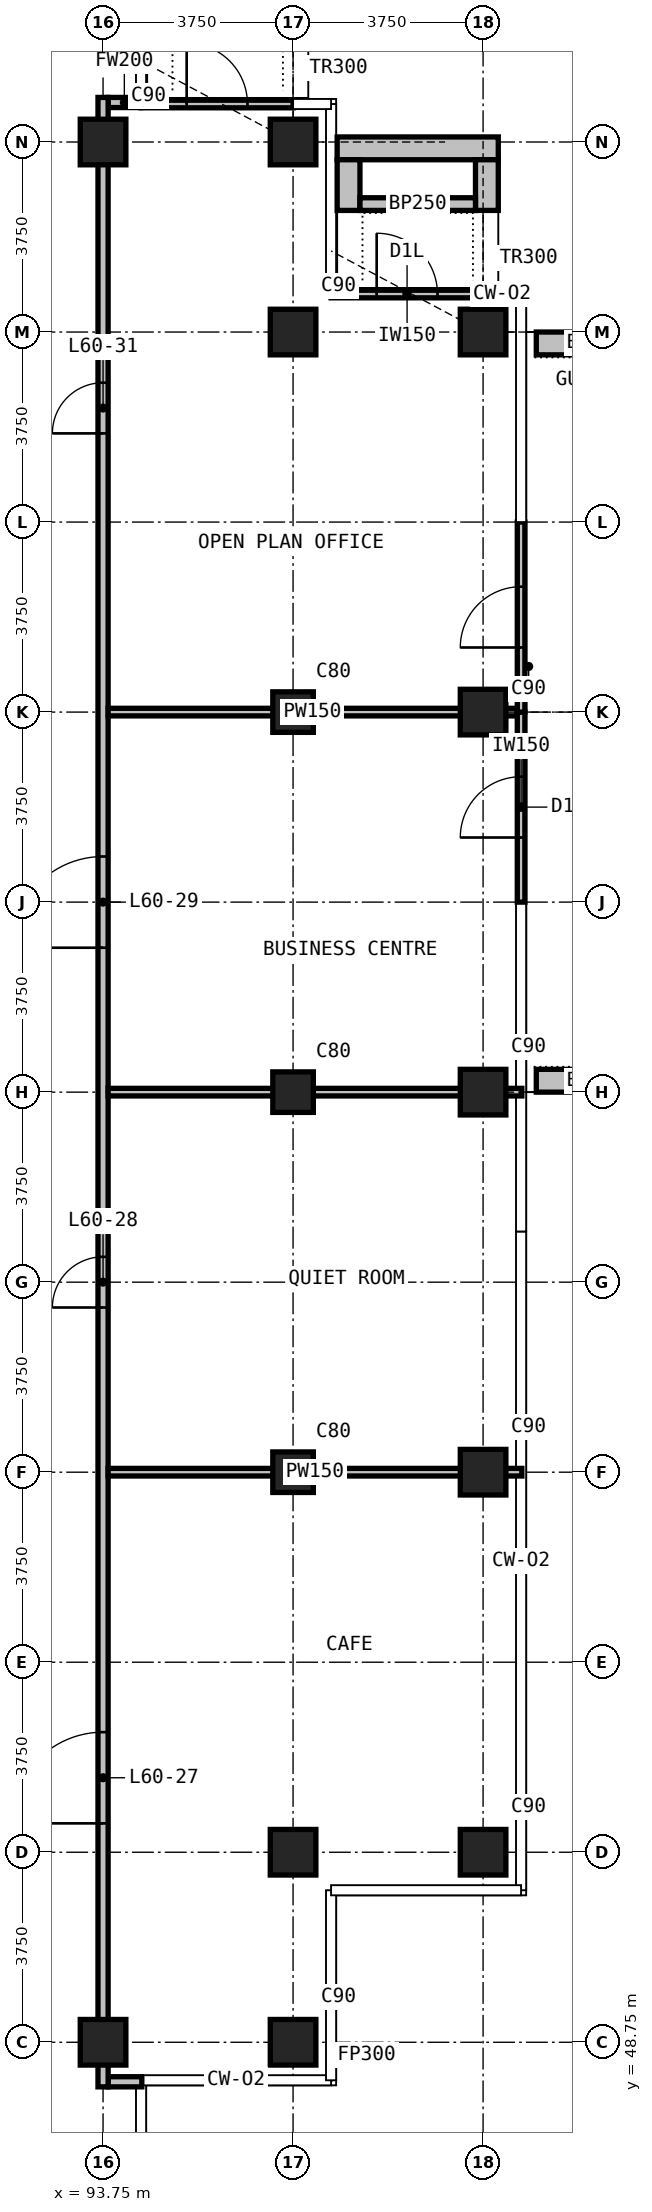
"""IFC4 building model, lengths in metres.
Left out: names, types, materials, properties, quantities, classifications, styles, units other than length and angle.
Written with IfcOpenShell. Run it as: python <this file> out.ifc"""

import sys

from ifc_helpers import new_model, si_unit, direction, frame, frame_2d, origin, origin_2d, place, context, subcontext, project, spatial, rectangle, extrude, element, fill, save


model = new_model("IFC4")
c1 = context("Model", 3, precision=1e-05, world=origin(), true_north=direction((0.0, 1.0)))
c2 = subcontext(c1, "Body", "Model", "MODEL_VIEW")
j1 = project(units=[si_unit("LENGTHUNIT", "METRE"), si_unit("PLANEANGLEUNIT", "RADIAN")], contexts=[c1])
p1 = place(None, origin())
s1 = spatial("IfcSite", under=j1, at=p1, CompositionType="ELEMENT")
p2 = place(p1, origin())
s2 = spatial("IfcBuilding", under=s1, at=p2, CompositionType="ELEMENT")
p3 = place(p2, frame((0.0, 0.0, 231.9)))
s3 = spatial("IfcBuildingStorey", under=s2, at=p3, CompositionType="ELEMENT", Elevation=231.9)
for number, where, z_axis, x_axis in (
    (1, (93.75, 48.75, 0.0), (0.0, 0.0, 1.0), (1.0, 0.0, 0.0)),
    (2, (93.75, 86.25, 0.0), (0.0, 0.0, 1.0), (1.0, 0.0, 0.0)),
    (3, (97.5, 48.75, 0.0), (0.0, 0.0, 1.0), (1.0, 0.0, 0.0)),
    (4, (97.5, 52.5, 0.0), (0.0, 0.0, 1.0), (1.0, 0.0, 0.0)),
):
    element("IfcColumn", number, at=place(p3, frame(where, z_axis=z_axis, x_axis=x_axis)), inside=s3, PredefinedType="COLUMN", context=c2, shape_type="SweptSolid", body=[
        extrude(rectangle(XDim=0.9, YDim=0.9, at=origin_2d()), origin(), (0.0, 0.0, 1.0), 3.6),
    ])
for number, where, z_axis, x_axis in (
    (5, (97.5, 60.0, 0.0), (0.0, 0.0, 1.0), (1.0, 0.0, 0.0)),
    (6, (97.5, 67.5, 0.0), (0.0, 0.0, 1.0), (1.0, 0.0, 0.0)),
    (7, (97.5, 75.0, 0.0), (0.0, 0.0, 1.0), (1.0, 0.0, 0.0)),
):
    element("IfcColumn", number, at=place(p3, frame(where, z_axis=z_axis, x_axis=x_axis)), inside=s3, PredefinedType="COLUMN", context=c2, shape_type="SweptSolid", body=[
        extrude(rectangle(XDim=0.8, YDim=0.8, at=origin_2d()), origin(), (0.0, 0.0, 1.0), 3.6),
    ])
for number, where, z_axis, x_axis in (
    (8, (97.5, 82.5, 0.0), (0.0, 0.0, 1.0), (1.0, 0.0, 0.0)),
    (9, (97.5, 86.25, 0.0), (0.0, 0.0, 1.0), (1.0, 0.0, 0.0)),
    (10, (101.25, 52.5, 0.0), (0.0, 0.0, 1.0), (1.0, 0.0, 0.0)),
    (11, (101.25, 60.0, 0.0), (0.0, 0.0, 1.0), (1.0, 0.0, 0.0)),
    (12, (101.25, 67.5, 0.0), (0.0, 0.0, 1.0), (1.0, 0.0, 0.0)),
    (13, (101.25, 75.0, 0.0), (0.0, 0.0, 1.0), (1.0, 0.0, 0.0)),
    (14, (101.25, 82.5, 0.0), (0.0, 0.0, 1.0), (1.0, 0.0, 0.0)),
):
    element("IfcColumn", number, at=place(p3, frame(where, z_axis=z_axis, x_axis=x_axis)), inside=s3, PredefinedType="COLUMN", context=c2, shape_type="SweptSolid", body=[
        extrude(rectangle(XDim=0.9, YDim=0.9, at=origin_2d()), origin(), (0.0, 0.0, 1.0), 3.6),
    ])
p4 = place(p3, frame((102.0, 71.25, 0.0), z_axis=(0.0, 0.0, 1.0), x_axis=(0.0, 1.0, 0.0)))
e15 = element("IfcWall", 15, at=p4, inside=s3, PredefinedType="SOLIDWALL", context=c2, shape_type="SweptSolid", body=[
    extrude(rectangle(XDim=3.75, YDim=0.15, at=frame_2d((1.875, 0.0))), origin(), (0.0, 0.0, 1.0), 3.3),
])
p5 = place(p4, frame((1.275, 0.0, 0.0)))
e16 = element("IfcOpeningElement", 16, at=p5, cuts=e15, PredefinedType="OPENING", context=c2, shape_type="SweptSolid", body=[
    extrude(rectangle(XDim=1.2, YDim=2.4, at=frame_2d((0.6, 1.2))), frame((0.0, 0.085, 0.0), z_axis=(0.0, -1.0, 0.0), x_axis=(1.0, 0.0, 0.0)), (0.0, 0.0, 1.0), 0.17),
])
p6 = place(p3, frame((102.0, 75.0, 0.0), z_axis=(0.0, 0.0, 1.0), x_axis=(0.0, 1.0, 0.0)))
e17 = element("IfcWall", 17, at=p6, inside=s3, PredefinedType="SOLIDWALL", context=c2, shape_type="SweptSolid", body=[
    extrude(rectangle(XDim=3.75, YDim=0.15, at=frame_2d((1.875, 0.0))), origin(), (0.0, 0.0, 1.0), 3.3),
])
p7 = place(p6, frame((1.275, 0.0, 0.0)))
e18 = element("IfcOpeningElement", 18, at=p7, cuts=e17, PredefinedType="OPENING", context=c2, shape_type="SweptSolid", body=[
    extrude(rectangle(XDim=1.2, YDim=2.4, at=frame_2d((0.6, 1.2))), frame((0.0, 0.085, 0.0), z_axis=(0.0, -1.0, 0.0), x_axis=(1.0, 0.0, 0.0)), (0.0, 0.0, 1.0), 0.17),
])
p8 = place(p3, frame((98.25, 83.25, 0.0), z_axis=(0.0, 0.0, 1.0), x_axis=(1.0, 0.0, 0.0)))
e19 = element("IfcWall", 19, at=p8, inside=s3, PredefinedType="SOLIDWALL", context=c2, shape_type="SweptSolid", body=[
    extrude(rectangle(XDim=3.0, YDim=0.15, at=frame_2d((1.5, 0.0))), origin(), (0.0, 0.0, 1.0), 3.3),
])
p9 = place(p8, frame((0.9, 0.0, 0.0)))
e20 = element("IfcOpeningElement", 20, at=p9, cuts=e19, PredefinedType="OPENING", context=c2, shape_type="SweptSolid", body=[
    extrude(rectangle(XDim=1.2, YDim=2.0, at=frame_2d((0.6, 1.0))), frame((0.0, 0.085, 0.0), z_axis=(0.0, -1.0, 0.0), x_axis=(1.0, 0.0, 0.0)), (0.0, 0.0, 1.0), 0.17),
])
p10 = place(p3, frame((94.5, 87.0, 0.0), z_axis=(0.0, 0.0, 1.0), x_axis=(1.0, 0.0, 0.0)))
e21 = element("IfcWall", 21, at=p10, inside=s3, PredefinedType="SOLIDWALL", context=c2, shape_type="SweptSolid", body=[
    extrude(rectangle(XDim=3.0, YDim=0.15, at=frame_2d((1.5, 0.0))), origin(), (0.0, 0.0, 1.0), 3.3),
])
p11 = place(p10, frame((0.9, 0.0, 0.0)))
e22 = element("IfcOpeningElement", 22, at=p11, cuts=e21, PredefinedType="OPENING", context=c2, shape_type="SweptSolid", body=[
    extrude(rectangle(XDim=1.2, YDim=2.0, at=frame_2d((0.6, 1.0))), frame((0.0, 0.085, 0.0), z_axis=(0.0, -1.0, 0.0), x_axis=(1.0, 0.0, 0.0)), (0.0, 0.0, 1.0), 0.17),
])
for number, where, z_axis, x_axis in (
    (23, (102.3, 67.725, 0.0), (0.0, 0.0, 1.0), (1.0, 0.0, 0.0)),
    (24, (102.3, 82.275, 0.0), (0.0, 0.0, 1.0), (1.0, 0.0, 0.0)),
):
    element("IfcWall", number, at=place(p3, frame(where, z_axis=z_axis, x_axis=x_axis)), inside=s3, PredefinedType="USERDEFINED", context=c2, shape_type="SweptSolid", body=[
        extrude(rectangle(XDim=2.35, YDim=0.45, at=frame_2d((1.175, 0.0))), origin(), (0.0, 0.0, 1.0), 1.1),
    ])
p12 = place(p3, frame((98.37, 86.125, 0.0), z_axis=(0.0, 0.0, 1.0), x_axis=(1.0, 0.0, 0.0)))
e25 = element("IfcWall", 25, at=p12, inside=s3, PredefinedType="USERDEFINED", context=c2, shape_type="SweptSolid", body=[
    extrude(rectangle(XDim=3.18, YDim=0.45, at=frame_2d((1.59, 0.0))), origin(), (0.0, 0.0, 1.0), 1.1),
])
for number, where, z_axis, x_axis in (
    (26, (98.595, 84.9, 0.0), (0.0, 0.0, 1.0), (0.0, 1.0, 0.0)),
    (27, (101.325, 84.9, 0.0), (0.0, 0.0, 1.0), (0.0, 1.0, 0.0)),
):
    element("IfcWall", number, at=place(p3, frame(where, z_axis=z_axis, x_axis=x_axis)), inside=s3, PredefinedType="USERDEFINED", context=c2, shape_type="SweptSolid", body=[
        extrude(rectangle(XDim=1.0, YDim=0.45, at=frame_2d((0.5, 0.0))), origin(), (0.0, 0.0, 1.0), 1.1),
    ])
p13 = place(p3, frame((98.82, 85.025, 0.0), z_axis=(0.0, 0.0, 1.0), x_axis=(1.0, 0.0, 0.0)))
e28 = element("IfcWall", 28, at=p13, inside=s3, PredefinedType="USERDEFINED", context=c2, shape_type="SweptSolid", body=[
    extrude(rectangle(XDim=2.28, YDim=0.25, at=frame_2d((1.14, 0.0))), origin(), (0.0, 0.0, 1.0), 1.0),
])
p14 = place(p3, frame((93.85, 47.97, 0.0), z_axis=(0.0, 0.0, 1.0), x_axis=(1.0, 0.0, 0.0)))
e29 = element("IfcWall", 29, at=p14, inside=s3, PredefinedType="PARTITIONING", context=c2, shape_type="SweptSolid", body=[
    extrude(rectangle(XDim=0.665, YDim=0.2, at=frame_2d((0.333, 0.0))), origin(), (0.0, 0.0, 1.0), 3.3),
])
p15 = place(p3, frame((93.85, 87.03, 0.0), z_axis=(0.0, 0.0, 1.0), x_axis=(1.0, 0.0, 0.0)))
e30 = element("IfcWall", 30, at=p15, inside=s3, PredefinedType="PARTITIONING", context=c2, shape_type="SweptSolid", body=[
    extrude(rectangle(XDim=0.64, YDim=0.2, at=frame_2d((0.32, 0.0))), origin(), (0.0, 0.0, 1.0), 3.3),
])
p16 = place(p3, frame((93.75, 47.87, 0.0), z_axis=(0.0, 0.0, 1.0), x_axis=(0.0, 1.0, 0.0)))
e31 = element("IfcWall", 31, at=p16, inside=s3, PredefinedType="PARTITIONING", context=c2, shape_type="SweptSolid", body=[
    extrude(rectangle(XDim=39.26, YDim=0.2, at=frame_2d((19.63, 0.0))), origin(), (0.0, 0.0, 1.0), 3.3),
])
p17 = place(p16, frame((5.2, 0.0, 0.0)))
e32 = element("IfcOpeningElement", 32, at=p17, cuts=e31, PredefinedType="OPENING", context=c2, shape_type="SweptSolid", body=[
    extrude(rectangle(XDim=1.8, YDim=2.2, at=frame_2d((0.9, 1.1))), frame((0.0, 0.11, 0.0), z_axis=(0.0, -1.0, 0.0), x_axis=(1.0, 0.0, 0.0)), (0.0, 0.0, 1.0), 0.22),
])
p18 = place(p16, frame((15.38, 0.0, 0.0)))
e33 = element("IfcOpeningElement", 33, at=p18, cuts=e31, PredefinedType="OPENING", context=c2, shape_type="SweptSolid", body=[
    extrude(rectangle(XDim=1.0, YDim=2.2, at=frame_2d((0.5, 1.1))), frame((0.0, 0.11, 0.0), z_axis=(0.0, -1.0, 0.0), x_axis=(1.0, 0.0, 0.0)), (0.0, 0.0, 1.0), 0.22),
])
p19 = place(p16, frame((22.48, 0.0, 0.0)))
e34 = element("IfcOpeningElement", 34, at=p19, cuts=e31, PredefinedType="OPENING", context=c2, shape_type="SweptSolid", body=[
    extrude(rectangle(XDim=1.8, YDim=2.2, at=frame_2d((0.9, 1.1))), frame((0.0, 0.11, 0.0), z_axis=(0.0, -1.0, 0.0), x_axis=(1.0, 0.0, 0.0)), (0.0, 0.0, 1.0), 0.22),
])
p20 = place(p16, frame((32.63, 0.0, 0.0)))
e35 = element("IfcOpeningElement", 35, at=p20, cuts=e31, PredefinedType="OPENING", context=c2, shape_type="SweptSolid", body=[
    extrude(rectangle(XDim=1.0, YDim=2.2, at=frame_2d((0.5, 1.1))), frame((0.0, 0.11, 0.0), z_axis=(0.0, -1.0, 0.0), x_axis=(1.0, 0.0, 0.0)), (0.0, 0.0, 1.0), 0.22),
])
for number, where, z_axis, x_axis in (
    (36, (93.85, 60.0, 0.0), (0.0, 0.0, 1.0), (1.0, 0.0, 0.0)),
    (37, (93.85, 67.5, 0.0), (0.0, 0.0, 1.0), (1.0, 0.0, 0.0)),
):
    element("IfcWall", number, at=place(p3, frame(where, z_axis=z_axis, x_axis=x_axis)), inside=s3, PredefinedType="PARTITIONING", context=c2, shape_type="SweptSolid", body=[
        extrude(rectangle(XDim=8.165, YDim=0.15, at=frame_2d((4.083, 0.0))), origin(), (0.0, 0.0, 1.0), 3.3),
    ])
p21 = place(p3, frame((93.85, 75.0, 0.0), z_axis=(0.0, 0.0, 1.0), x_axis=(1.0, 0.0, 0.0)))
e38 = element("IfcWall", 38, at=p21, inside=s3, PredefinedType="PARTITIONING", context=c2, shape_type="SweptSolid", body=[
    extrude(rectangle(XDim=8.065, YDim=0.15, at=frame_2d((4.032, 0.0))), origin(), (0.0, 0.0, 1.0), 3.3),
])
p22 = place(p5, origin())
e39 = element("IfcDoor", 39, at=p22, inside=s3, OperationType="SINGLE_SWING_LEFT", PredefinedType="DOOR", context=c2, shape_type="SweptSolid", body=[
    extrude(rectangle(XDim=1.2, YDim=2.4, at=frame_2d((0.6, 1.2))), frame((0.0, 0.025, 0.0), z_axis=(0.0, -1.0, 0.0), x_axis=(1.0, 0.0, 0.0)), (0.0, 0.0, 1.0), 0.05),
])
fill(e16, e39)
p23 = place(p7, origin())
e40 = element("IfcDoor", 40, at=p23, inside=s3, OperationType="SINGLE_SWING_LEFT", PredefinedType="DOOR", context=c2, shape_type="SweptSolid", body=[
    extrude(rectangle(XDim=1.2, YDim=2.4, at=frame_2d((0.6, 1.2))), frame((0.0, 0.025, 0.0), z_axis=(0.0, -1.0, 0.0), x_axis=(1.0, 0.0, 0.0)), (0.0, 0.0, 1.0), 0.05),
])
fill(e18, e40)
p24 = place(p9, origin())
e41 = element("IfcDoor", 41, at=p24, inside=s3, OperationType="SINGLE_SWING_LEFT", PredefinedType="DOOR", context=c2, shape_type="SweptSolid", body=[
    extrude(rectangle(XDim=1.2, YDim=2.0, at=frame_2d((0.6, 1.0))), frame((0.0, 0.025, 0.0), z_axis=(0.0, -1.0, 0.0), x_axis=(1.0, 0.0, 0.0)), (0.0, 0.0, 1.0), 0.05),
])
fill(e20, e41)
p25 = place(p11, origin())
e42 = element("IfcDoor", 42, at=p25, inside=s3, OperationType="SINGLE_SWING_LEFT", PredefinedType="DOOR", context=c2, shape_type="SweptSolid", body=[
    extrude(rectangle(XDim=1.2, YDim=2.0, at=frame_2d((0.6, 1.0))), frame((0.0, 0.025, 0.0), z_axis=(0.0, -1.0, 0.0), x_axis=(1.0, 0.0, 0.0)), (0.0, 0.0, 1.0), 0.05),
])
fill(e22, e42)
p26 = place(p17, origin())
e43 = element("IfcDoor", 43, at=p26, inside=s3, OperationType="DOUBLE_DOOR_SINGLE_SWING", PredefinedType="DOOR", context=c2, shape_type="SweptSolid", body=[
    extrude(rectangle(XDim=1.8, YDim=2.2, at=frame_2d((0.9, 1.1))), frame((0.0, 0.025, 0.0), z_axis=(0.0, -1.0, 0.0), x_axis=(1.0, 0.0, 0.0)), (0.0, 0.0, 1.0), 0.05),
])
fill(e32, e43)
p27 = place(p18, origin())
e44 = element("IfcDoor", 44, at=p27, inside=s3, OperationType="SINGLE_SWING_LEFT", PredefinedType="DOOR", context=c2, shape_type="SweptSolid", body=[
    extrude(rectangle(XDim=1.0, YDim=2.2, at=frame_2d((0.5, 1.1))), frame((0.0, 0.025, 0.0), z_axis=(0.0, -1.0, 0.0), x_axis=(1.0, 0.0, 0.0)), (0.0, 0.0, 1.0), 0.05),
])
fill(e33, e44)
p28 = place(p19, origin())
e45 = element("IfcDoor", 45, at=p28, inside=s3, OperationType="DOUBLE_DOOR_SINGLE_SWING", PredefinedType="DOOR", context=c2, shape_type="SweptSolid", body=[
    extrude(rectangle(XDim=1.8, YDim=2.2, at=frame_2d((0.9, 1.1))), frame((0.0, 0.025, 0.0), z_axis=(0.0, -1.0, 0.0), x_axis=(1.0, 0.0, 0.0)), (0.0, 0.0, 1.0), 0.05),
])
fill(e34, e45)
p29 = place(p20, origin())
e46 = element("IfcDoor", 46, at=p29, inside=s3, OperationType="SINGLE_SWING_RIGHT", PredefinedType="DOOR", context=c2, shape_type="SweptSolid", body=[
    extrude(rectangle(XDim=1.0, YDim=2.2, at=frame_2d((0.5, 1.1))), frame((0.0, 0.025, 0.0), z_axis=(0.0, -1.0, 0.0), x_axis=(1.0, 0.0, 0.0)), (0.0, 0.0, 1.0), 0.05),
])
fill(e35, e46)
save(model, sys.argv[1])
